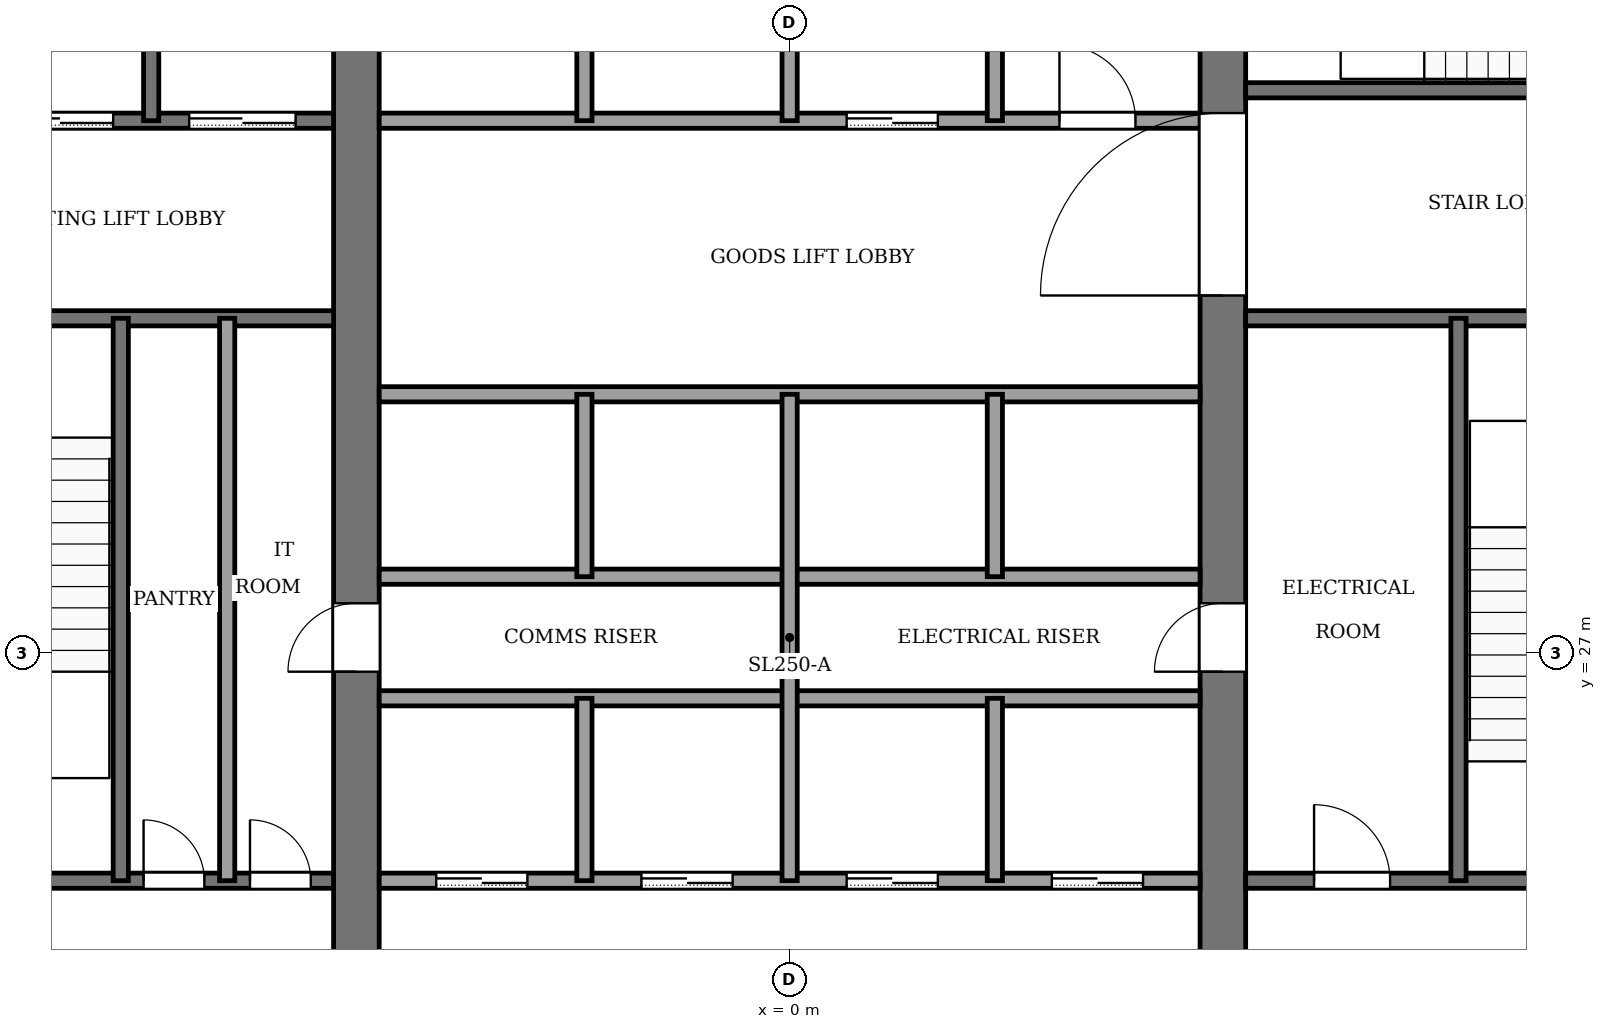
"""IFC4 building model, lengths in metres.
Left out: names, types, materials, properties, quantities, classifications, styles, units other than length and angle.
Written with IfcOpenShell. Run it as: python <this file> out.ifc"""

import sys

from ifc_helpers import new_model, si_unit, direction, frame, frame_2d, origin, place, context, subcontext, project, spatial, rectangle, extrude, element, fill, save


model = new_model("IFC4")
c1 = context("Model", 3, precision=1e-05, world=origin(), true_north=direction((0.0, 1.0)))
c2 = subcontext(c1, "Body", "Model", "MODEL_VIEW")
j1 = project(units=[si_unit("LENGTHUNIT", "METRE"), si_unit("PLANEANGLEUNIT", "RADIAN")], contexts=[c1])
p1 = place(None, origin())
s1 = spatial("IfcSite", under=j1, at=p1, CompositionType="ELEMENT")
p2 = place(p1, origin())
s2 = spatial("IfcBuilding", under=s1, at=p2, CompositionType="ELEMENT")
p3 = place(p2, frame((0.0, 0.0, 18.0)))
s3 = spatial("IfcBuildingStorey", under=s2, at=p3, CompositionType="ELEMENT", Elevation=18.0)
p4 = place(p3, frame((-5.7, 18.4, -0.13), z_axis=(0.0, 0.0, 1.0), x_axis=(0.0, 1.0, 0.0)))
e1 = element("IfcWall", 1, at=p4, inside=s3, PredefinedType="SHEAR", context=c2, shape_type="SweptSolid", body=[
    extrude(rectangle(XDim=19.2, YDim=0.6, at=frame_2d((9.6, 0.0))), origin(), (0.0, 0.0, 1.0), 4.0),
])
p5 = place(p4, frame((8.35, 0.0, 0.13)))
e2 = element("IfcOpeningElement", 2, at=p5, cuts=e1, PredefinedType="OPENING", context=c2, shape_type="SweptSolid", body=[
    extrude(rectangle(XDim=0.9, YDim=2.1, at=frame_2d((0.45, 1.05))), frame((0.0, 0.31, 0.0), z_axis=(0.0, -1.0, 0.0), x_axis=(1.0, 0.0, 0.0)), (0.0, 0.0, 1.0), 0.62),
])
p6 = place(p3, frame((5.7, 18.4, -0.13), z_axis=(0.0, 0.0, 1.0), x_axis=(0.0, 1.0, 0.0)))
e3 = element("IfcWall", 3, at=p6, inside=s3, PredefinedType="SHEAR", context=c2, shape_type="SweptSolid", body=[
    extrude(rectangle(XDim=19.2, YDim=0.6, at=frame_2d((9.6, 0.0))), origin(), (0.0, 0.0, 1.0), 4.0),
])
p7 = place(p6, frame((8.35, 0.0, 0.13)))
e4 = element("IfcOpeningElement", 4, at=p7, cuts=e3, PredefinedType="OPENING", context=c2, shape_type="SweptSolid", body=[
    extrude(rectangle(XDim=0.9, YDim=2.1, at=frame_2d((0.45, 1.05))), frame((0.0, 0.31, 0.0), z_axis=(0.0, -1.0, 0.0), x_axis=(1.0, 0.0, 0.0)), (0.0, 0.0, 1.0), 0.62),
])
p8 = place(p6, frame((13.3, 0.0, 0.13)))
e5 = element("IfcOpeningElement", 5, at=p8, cuts=e3, PredefinedType="OPENING", context=c2, shape_type="SweptSolid", body=[
    extrude(rectangle(XDim=2.4, YDim=2.4, at=frame_2d((1.2, 1.2))), frame((0.0, 0.31, 0.0), z_axis=(0.0, -1.0, 0.0), x_axis=(1.0, 0.0, 0.0)), (0.0, 0.0, 1.0), 0.62),
])
p9 = place(p3, frame((-12.6, 24.0, 0.0), z_axis=(0.0, 0.0, 1.0), x_axis=(1.0, 0.0, 0.0)))
e6 = element("IfcWall", 6, at=p9, inside=s3, PredefinedType="PARTITIONING", context=c2, shape_type="SweptSolid", body=[
    extrude(rectangle(XDim=6.6, YDim=0.2, at=frame_2d((3.3, 0.0))), origin(), (0.0, 0.0, 1.0), 3.87),
])
p10 = place(p9, frame((4.1, 0.0, 0.0)))
e7 = element("IfcOpeningElement", 7, at=p10, cuts=e6, PredefinedType="OPENING", context=c2, shape_type="SweptSolid", body=[
    extrude(rectangle(XDim=0.8, YDim=2.1, at=frame_2d((0.4, 1.05))), frame((0.0, 0.11, 0.0), z_axis=(0.0, -1.0, 0.0), x_axis=(1.0, 0.0, 0.0)), (0.0, 0.0, 1.0), 0.22),
])
p11 = place(p9, frame((5.5, 0.0, 0.0)))
e8 = element("IfcOpeningElement", 8, at=p11, cuts=e6, PredefinedType="OPENING", context=c2, shape_type="SweptSolid", body=[
    extrude(rectangle(XDim=0.8, YDim=2.1, at=frame_2d((0.4, 1.05))), frame((0.0, 0.11, 0.0), z_axis=(0.0, -1.0, 0.0), x_axis=(1.0, 0.0, 0.0)), (0.0, 0.0, 1.0), 0.22),
])
p12 = place(p3, frame((-5.4, 24.0, 0.0), z_axis=(0.0, 0.0, 1.0), x_axis=(1.0, 0.0, 0.0)))
e9 = element("IfcWall", 9, at=p12, inside=s3, PredefinedType="PARTITIONING", context=c2, shape_type="SweptSolid", body=[
    extrude(rectangle(XDim=10.8, YDim=0.2, at=frame_2d((5.4, 0.0))), origin(), (0.0, 0.0, 1.0), 3.87),
])
p13 = place(p12, frame((0.75, 0.0, 0.0)))
e10 = element("IfcOpeningElement", 10, at=p13, cuts=e9, PredefinedType="OPENING", context=c2, shape_type="SweptSolid", body=[
    extrude(rectangle(XDim=1.2, YDim=2.2, at=frame_2d((0.6, 1.1))), frame((0.0, 0.11, 0.0), z_axis=(0.0, -1.0, 0.0), x_axis=(1.0, 0.0, 0.0)), (0.0, 0.0, 1.0), 0.22),
])
p14 = place(p12, frame((3.45, 0.0, 0.0)))
e11 = element("IfcOpeningElement", 11, at=p14, cuts=e9, PredefinedType="OPENING", context=c2, shape_type="SweptSolid", body=[
    extrude(rectangle(XDim=1.2, YDim=2.2, at=frame_2d((0.6, 1.1))), frame((0.0, 0.11, 0.0), z_axis=(0.0, -1.0, 0.0), x_axis=(1.0, 0.0, 0.0)), (0.0, 0.0, 1.0), 0.22),
])
p15 = place(p12, frame((6.15, 0.0, 0.0)))
e12 = element("IfcOpeningElement", 12, at=p15, cuts=e9, PredefinedType="OPENING", context=c2, shape_type="SweptSolid", body=[
    extrude(rectangle(XDim=1.2, YDim=2.2, at=frame_2d((0.6, 1.1))), frame((0.0, 0.11, 0.0), z_axis=(0.0, -1.0, 0.0), x_axis=(1.0, 0.0, 0.0)), (0.0, 0.0, 1.0), 0.22),
])
p16 = place(p12, frame((8.85, 0.0, 0.0)))
e13 = element("IfcOpeningElement", 13, at=p16, cuts=e9, PredefinedType="OPENING", context=c2, shape_type="SweptSolid", body=[
    extrude(rectangle(XDim=1.2, YDim=2.2, at=frame_2d((0.6, 1.1))), frame((0.0, 0.11, 0.0), z_axis=(0.0, -1.0, 0.0), x_axis=(1.0, 0.0, 0.0)), (0.0, 0.0, 1.0), 0.22),
])
p17 = place(p3, frame((6.0, 24.0, 0.0), z_axis=(0.0, 0.0, 1.0), x_axis=(1.0, 0.0, 0.0)))
e14 = element("IfcWall", 14, at=p17, inside=s3, PredefinedType="PARTITIONING", context=c2, shape_type="SweptSolid", body=[
    extrude(rectangle(XDim=6.6, YDim=0.2, at=frame_2d((3.3, 0.0))), origin(), (0.0, 0.0, 1.0), 3.87),
])
p18 = place(p17, frame((0.9, 0.0, 0.0)))
e15 = element("IfcOpeningElement", 15, at=p18, cuts=e14, PredefinedType="OPENING", context=c2, shape_type="SweptSolid", body=[
    extrude(rectangle(XDim=1.0, YDim=2.1, at=frame_2d((0.5, 1.05))), frame((0.0, 0.11, 0.0), z_axis=(0.0, -1.0, 0.0), x_axis=(1.0, 0.0, 0.0)), (0.0, 0.0, 1.0), 0.22),
])
p19 = place(p17, frame((4.4, 0.0, 0.0)))
e16 = element("IfcOpeningElement", 16, at=p19, cuts=e14, PredefinedType="OPENING", context=c2, shape_type="SweptSolid", body=[
    extrude(rectangle(XDim=1.2, YDim=2.2, at=frame_2d((0.6, 1.1))), frame((0.0, 0.11, 0.0), z_axis=(0.0, -1.0, 0.0), x_axis=(1.0, 0.0, 0.0)), (0.0, 0.0, 1.0), 0.22),
])
for number, where, z_axis, x_axis in (
    (17, (-5.4, 26.4, 0.0), (0.0, 0.0, 1.0), (1.0, 0.0, 0.0)),
    (18, (-5.4, 28.0, 0.0), (0.0, 0.0, 1.0), (1.0, 0.0, 0.0)),
    (19, (-5.4, 30.4, 0.0), (0.0, 0.0, 1.0), (1.0, 0.0, 0.0)),
):
    element("IfcWall", number, at=place(p3, frame(where, z_axis=z_axis, x_axis=x_axis)), inside=s3, PredefinedType="PARTITIONING", context=c2, shape_type="SweptSolid", body=[
        extrude(rectangle(XDim=10.8, YDim=0.2, at=frame_2d((5.4, 0.0))), origin(), (0.0, 0.0, 1.0), 3.87),
    ])
p20 = place(p3, frame((-12.6, 31.4, 0.0), z_axis=(0.0, 0.0, 1.0), x_axis=(1.0, 0.0, 0.0)))
e20 = element("IfcWall", 20, at=p20, inside=s3, PredefinedType="PARTITIONING", context=c2, shape_type="SweptSolid", body=[
    extrude(rectangle(XDim=6.6, YDim=0.2, at=frame_2d((3.3, 0.0))), origin(), (0.0, 0.0, 1.0), 3.87),
])
p21 = place(p20, frame((1.0, 0.0, 0.0)))
e21 = element("IfcOpeningElement", 21, at=p21, cuts=e20, PredefinedType="OPENING", context=c2, shape_type="SweptSolid", body=[
    extrude(rectangle(XDim=1.2, YDim=2.2, at=frame_2d((0.6, 1.1))), frame((0.0, 0.11, 0.0), z_axis=(0.0, -1.0, 0.0), x_axis=(1.0, 0.0, 0.0)), (0.0, 0.0, 1.0), 0.22),
])
p22 = place(p3, frame((6.0, 31.4, 0.0), z_axis=(0.0, 0.0, 1.0), x_axis=(1.0, 0.0, 0.0)))
e22 = element("IfcWall", 22, at=p22, inside=s3, PredefinedType="PARTITIONING", context=c2, shape_type="SweptSolid", body=[
    extrude(rectangle(XDim=6.6, YDim=0.2, at=frame_2d((3.3, 0.0))), origin(), (0.0, 0.0, 1.0), 3.87),
])
p23 = place(p3, frame((-12.6, 34.0, 0.0), z_axis=(0.0, 0.0, 1.0), x_axis=(1.0, 0.0, 0.0)))
e23 = element("IfcWall", 23, at=p23, inside=s3, PredefinedType="PARTITIONING", context=c2, shape_type="SweptSolid", body=[
    extrude(rectangle(XDim=6.6, YDim=0.2, at=frame_2d((3.3, 0.0))), origin(), (0.0, 0.0, 1.0), 3.87),
])
p24 = place(p23, frame((4.7, 0.0, 0.0)))
e24 = element("IfcOpeningElement", 24, at=p24, cuts=e23, PredefinedType="OPENING", context=c2, shape_type="SweptSolid", body=[
    extrude(rectangle(XDim=1.4, YDim=2.2, at=frame_2d((0.7, 1.1))), frame((0.0, 0.11, 0.0), z_axis=(0.0, -1.0, 0.0), x_axis=(1.0, 0.0, 0.0)), (0.0, 0.0, 1.0), 0.22),
])
p25 = place(p23, frame((2.3, 0.0, 0.0)))
e25 = element("IfcOpeningElement", 25, at=p25, cuts=e23, PredefinedType="OPENING", context=c2, shape_type="SweptSolid", body=[
    extrude(rectangle(XDim=1.4, YDim=2.2, at=frame_2d((0.7, 1.1))), frame((0.0, 0.11, 0.0), z_axis=(0.0, -1.0, 0.0), x_axis=(1.0, 0.0, 0.0)), (0.0, 0.0, 1.0), 0.22),
])
p26 = place(p23, frame((0.45, 0.0, 0.0)))
e26 = element("IfcOpeningElement", 26, at=p26, cuts=e23, PredefinedType="OPENING", context=c2, shape_type="SweptSolid", body=[
    extrude(rectangle(XDim=0.9, YDim=2.1, at=frame_2d((0.45, 1.05))), frame((0.0, 0.11, 0.0), z_axis=(0.0, -1.0, 0.0), x_axis=(1.0, 0.0, 0.0)), (0.0, 0.0, 1.0), 0.22),
])
p27 = place(p3, frame((-5.4, 34.0, 0.0), z_axis=(0.0, 0.0, 1.0), x_axis=(1.0, 0.0, 0.0)))
e27 = element("IfcWall", 27, at=p27, inside=s3, PredefinedType="PARTITIONING", context=c2, shape_type="SweptSolid", body=[
    extrude(rectangle(XDim=10.8, YDim=0.2, at=frame_2d((5.4, 0.0))), origin(), (0.0, 0.0, 1.0), 3.87),
])
p28 = place(p27, frame((6.15, 0.0, 0.0)))
e28 = element("IfcOpeningElement", 28, at=p28, cuts=e27, PredefinedType="OPENING", context=c2, shape_type="SweptSolid", body=[
    extrude(rectangle(XDim=1.2, YDim=2.2, at=frame_2d((0.6, 1.1))), frame((0.0, 0.11, 0.0), z_axis=(0.0, -1.0, 0.0), x_axis=(1.0, 0.0, 0.0)), (0.0, 0.0, 1.0), 0.22),
])
p29 = place(p27, frame((8.95, 0.0, 0.0)))
e29 = element("IfcOpeningElement", 29, at=p29, cuts=e27, PredefinedType="OPENING", context=c2, shape_type="SweptSolid", body=[
    extrude(rectangle(XDim=1.0, YDim=2.1, at=frame_2d((0.5, 1.05))), frame((0.0, 0.11, 0.0), z_axis=(0.0, -1.0, 0.0), x_axis=(1.0, 0.0, 0.0)), (0.0, 0.0, 1.0), 0.22),
])
p30 = place(p3, frame((6.0, 34.4, 0.0), z_axis=(0.0, 0.0, 1.0), x_axis=(1.0, 0.0, 0.0)))
e30 = element("IfcWall", 30, at=p30, inside=s3, PredefinedType="PARTITIONING", context=c2, shape_type="SweptSolid", body=[
    extrude(rectangle(XDim=6.6, YDim=0.2, at=frame_2d((3.3, 0.0))), origin(), (0.0, 0.0, 1.0), 3.87),
])
p31 = place(p30, frame((4.8, 0.0, 0.0)))
e31 = element("IfcOpeningElement", 31, at=p31, cuts=e30, PredefinedType="OPENING", context=c2, shape_type="SweptSolid", body=[
    extrude(rectangle(XDim=1.2, YDim=2.2, at=frame_2d((0.6, 1.1))), frame((0.0, 0.11, 0.0), z_axis=(0.0, -1.0, 0.0), x_axis=(1.0, 0.0, 0.0)), (0.0, 0.0, 1.0), 0.22),
])
p32 = place(p3, frame((-8.8, 24.0, 0.0), z_axis=(0.0, 0.0, 1.0), x_axis=(0.0, 1.0, 0.0)))
e32 = element("IfcWall", 32, at=p32, inside=s3, PredefinedType="PARTITIONING", context=c2, shape_type="SweptSolid", body=[
    extrude(rectangle(XDim=7.4, YDim=0.2, at=frame_2d((3.7, 0.0))), origin(), (0.0, 0.0, 1.0), 3.87),
])
p33 = place(p3, frame((-8.4, 34.0, 0.0), z_axis=(0.0, 0.0, 1.0), x_axis=(0.0, 1.0, 0.0)))
e33 = element("IfcWall", 33, at=p33, inside=s3, PredefinedType="PARTITIONING", context=c2, shape_type="SweptSolid", body=[
    extrude(rectangle(XDim=3.6, YDim=0.2, at=frame_2d((1.8, 0.0))), origin(), (0.0, 0.0, 1.0), 3.87),
])
p34 = place(p3, frame((-7.4, 24.0, 0.0), z_axis=(0.0, 0.0, 1.0), x_axis=(0.0, 1.0, 0.0)))
e34 = element("IfcWall", 34, at=p34, inside=s3, PredefinedType="PARTITIONING", context=c2, shape_type="SweptSolid", body=[
    extrude(rectangle(XDim=7.4, YDim=0.2, at=frame_2d((3.7, 0.0))), origin(), (0.0, 0.0, 1.0), 3.87),
])
for number, where, z_axis, x_axis in (
    (35, (-2.7, 24.0, 0.0), (0.0, 0.0, 1.0), (0.0, 1.0, 0.0)),
    (36, (-2.7, 28.0, 0.0), (0.0, 0.0, 1.0), (0.0, 1.0, 0.0)),
):
    element("IfcWall", number, at=place(p3, frame(where, z_axis=z_axis, x_axis=x_axis)), inside=s3, PredefinedType="PARTITIONING", context=c2, shape_type="SweptSolid", body=[
        extrude(rectangle(XDim=2.4, YDim=0.2, at=frame_2d((1.2, 0.0))), origin(), (0.0, 0.0, 1.0), 3.87),
    ])
p35 = place(p3, frame((-2.7, 34.0, 0.0), z_axis=(0.0, 0.0, 1.0), x_axis=(0.0, 1.0, 0.0)))
e37 = element("IfcWall", 37, at=p35, inside=s3, PredefinedType="PARTITIONING", context=c2, shape_type="SweptSolid", body=[
    extrude(rectangle(XDim=3.6, YDim=0.2, at=frame_2d((1.8, 0.0))), origin(), (0.0, 0.0, 1.0), 3.87),
])
p36 = place(p3, frame((0.0, 24.0, 0.0), z_axis=(0.0, 0.0, 1.0), x_axis=(0.0, 1.0, 0.0)))
e38 = element("IfcWall", 38, at=p36, inside=s3, PredefinedType="PARTITIONING", context=c2, shape_type="SweptSolid", body=[
    extrude(rectangle(XDim=6.4, YDim=0.2, at=frame_2d((3.2, 0.0))), origin(), (0.0, 0.0, 1.0), 3.87),
])
p37 = place(p3, frame((0.0, 34.0, 0.0), z_axis=(0.0, 0.0, 1.0), x_axis=(0.0, 1.0, 0.0)))
e39 = element("IfcWall", 39, at=p37, inside=s3, PredefinedType="PARTITIONING", context=c2, shape_type="SweptSolid", body=[
    extrude(rectangle(XDim=3.6, YDim=0.2, at=frame_2d((1.8, 0.0))), origin(), (0.0, 0.0, 1.0), 3.87),
])
for number, where, z_axis, x_axis in (
    (40, (2.7, 24.0, 0.0), (0.0, 0.0, 1.0), (0.0, 1.0, 0.0)),
    (41, (2.7, 28.0, 0.0), (0.0, 0.0, 1.0), (0.0, 1.0, 0.0)),
):
    element("IfcWall", number, at=place(p3, frame(where, z_axis=z_axis, x_axis=x_axis)), inside=s3, PredefinedType="PARTITIONING", context=c2, shape_type="SweptSolid", body=[
        extrude(rectangle(XDim=2.4, YDim=0.2, at=frame_2d((1.2, 0.0))), origin(), (0.0, 0.0, 1.0), 3.87),
    ])
p38 = place(p3, frame((2.7, 34.0, 0.0), z_axis=(0.0, 0.0, 1.0), x_axis=(0.0, 1.0, 0.0)))
e42 = element("IfcWall", 42, at=p38, inside=s3, PredefinedType="PARTITIONING", context=c2, shape_type="SweptSolid", body=[
    extrude(rectangle(XDim=3.6, YDim=0.2, at=frame_2d((1.8, 0.0))), origin(), (0.0, 0.0, 1.0), 3.87),
])
p39 = place(p3, frame((8.8, 24.0, 0.0), z_axis=(0.0, 0.0, 1.0), x_axis=(0.0, 1.0, 0.0)))
e43 = element("IfcWall", 43, at=p39, inside=s3, PredefinedType="PARTITIONING", context=c2, shape_type="SweptSolid", body=[
    extrude(rectangle(XDim=7.4, YDim=0.2, at=frame_2d((3.7, 0.0))), origin(), (0.0, 0.0, 1.0), 3.87),
])
p40 = place(p13, origin())
e44 = element("IfcDoor", 44, at=p40, inside=s3, OperationType="SLIDING_TO_LEFT", PredefinedType="DOOR", context=c2, shape_type="SweptSolid", body=[
    extrude(rectangle(XDim=1.2, YDim=2.2, at=frame_2d((0.6, 1.1))), frame((0.0, 0.025, 0.0), z_axis=(0.0, -1.0, 0.0), x_axis=(1.0, 0.0, 0.0)), (0.0, 0.0, 1.0), 0.05),
])
fill(e10, e44)
p41 = place(p14, origin())
e45 = element("IfcDoor", 45, at=p41, inside=s3, OperationType="SLIDING_TO_LEFT", PredefinedType="DOOR", context=c2, shape_type="SweptSolid", body=[
    extrude(rectangle(XDim=1.2, YDim=2.2, at=frame_2d((0.6, 1.1))), frame((0.0, 0.025, 0.0), z_axis=(0.0, -1.0, 0.0), x_axis=(1.0, 0.0, 0.0)), (0.0, 0.0, 1.0), 0.05),
])
fill(e11, e45)
p42 = place(p15, origin())
e46 = element("IfcDoor", 46, at=p42, inside=s3, OperationType="SLIDING_TO_LEFT", PredefinedType="DOOR", context=c2, shape_type="SweptSolid", body=[
    extrude(rectangle(XDim=1.2, YDim=2.2, at=frame_2d((0.6, 1.1))), frame((0.0, 0.025, 0.0), z_axis=(0.0, -1.0, 0.0), x_axis=(1.0, 0.0, 0.0)), (0.0, 0.0, 1.0), 0.05),
])
fill(e12, e46)
p43 = place(p16, origin())
e47 = element("IfcDoor", 47, at=p43, inside=s3, OperationType="SLIDING_TO_LEFT", PredefinedType="DOOR", context=c2, shape_type="SweptSolid", body=[
    extrude(rectangle(XDim=1.2, YDim=2.2, at=frame_2d((0.6, 1.1))), frame((0.0, 0.025, 0.0), z_axis=(0.0, -1.0, 0.0), x_axis=(1.0, 0.0, 0.0)), (0.0, 0.0, 1.0), 0.05),
])
fill(e13, e47)
p44 = place(p28, origin())
e48 = element("IfcDoor", 48, at=p44, inside=s3, OperationType="SLIDING_TO_LEFT", PredefinedType="DOOR", context=c2, shape_type="SweptSolid", body=[
    extrude(rectangle(XDim=1.2, YDim=2.2, at=frame_2d((0.6, 1.1))), frame((0.0, 0.025, 0.0), z_axis=(0.0, -1.0, 0.0), x_axis=(1.0, 0.0, 0.0)), (0.0, 0.0, 1.0), 0.05),
])
fill(e28, e48)
p45 = place(p24, origin())
e49 = element("IfcDoor", 49, at=p45, inside=s3, OperationType="SLIDING_TO_LEFT", PredefinedType="DOOR", context=c2, shape_type="SweptSolid", body=[
    extrude(rectangle(XDim=1.4, YDim=2.2, at=frame_2d((0.7, 1.1))), frame((0.0, 0.025, 0.0), z_axis=(0.0, -1.0, 0.0), x_axis=(1.0, 0.0, 0.0)), (0.0, 0.0, 1.0), 0.05),
])
fill(e24, e49)
p46 = place(p25, origin())
e50 = element("IfcDoor", 50, at=p46, inside=s3, OperationType="SLIDING_TO_LEFT", PredefinedType="DOOR", context=c2, shape_type="SweptSolid", body=[
    extrude(rectangle(XDim=1.4, YDim=2.2, at=frame_2d((0.7, 1.1))), frame((0.0, 0.025, 0.0), z_axis=(0.0, -1.0, 0.0), x_axis=(1.0, 0.0, 0.0)), (0.0, 0.0, 1.0), 0.05),
])
fill(e25, e50)
p47 = place(p10, origin())
e51 = element("IfcDoor", 51, at=p47, inside=s3, OperationType="SINGLE_SWING_LEFT", PredefinedType="DOOR", context=c2, shape_type="SweptSolid", body=[
    extrude(rectangle(XDim=0.8, YDim=2.1, at=frame_2d((0.4, 1.05))), frame((0.0, 0.025, 0.0), z_axis=(0.0, -1.0, 0.0), x_axis=(1.0, 0.0, 0.0)), (0.0, 0.0, 1.0), 0.05),
])
fill(e7, e51)
p48 = place(p11, origin())
e52 = element("IfcDoor", 52, at=p48, inside=s3, OperationType="SINGLE_SWING_RIGHT", PredefinedType="DOOR", context=c2, shape_type="SweptSolid", body=[
    extrude(rectangle(XDim=0.8, YDim=2.1, at=frame_2d((0.4, 1.05))), frame((0.0, 0.025, 0.0), z_axis=(0.0, -1.0, 0.0), x_axis=(1.0, 0.0, 0.0)), (0.0, 0.0, 1.0), 0.05),
])
fill(e8, e52)
p49 = place(p18, origin())
e53 = element("IfcDoor", 53, at=p49, inside=s3, OperationType="SINGLE_SWING_RIGHT", PredefinedType="DOOR", context=c2, shape_type="SweptSolid", body=[
    extrude(rectangle(XDim=1.0, YDim=2.1, at=frame_2d((0.5, 1.05))), frame((0.0, 0.025, 0.0), z_axis=(0.0, -1.0, 0.0), x_axis=(1.0, 0.0, 0.0)), (0.0, 0.0, 1.0), 0.05),
])
fill(e15, e53)
p50 = place(p29, origin())
e54 = element("IfcDoor", 54, at=p50, inside=s3, OperationType="SINGLE_SWING_LEFT", PredefinedType="DOOR", context=c2, shape_type="SweptSolid", body=[
    extrude(rectangle(XDim=1.0, YDim=2.1, at=frame_2d((0.5, 1.05))), frame((0.0, 0.025, 0.0), z_axis=(0.0, -1.0, 0.0), x_axis=(1.0, 0.0, 0.0)), (0.0, 0.0, 1.0), 0.05),
])
fill(e29, e54)
p51 = place(p5, origin())
e55 = element("IfcDoor", 55, at=p51, inside=s3, OperationType="SINGLE_SWING_LEFT", PredefinedType="DOOR", context=c2, shape_type="SweptSolid", body=[
    extrude(rectangle(XDim=0.9, YDim=2.1, at=frame_2d((0.45, 1.05))), frame((0.0, 0.025, 0.0), z_axis=(0.0, -1.0, 0.0), x_axis=(1.0, 0.0, 0.0)), (0.0, 0.0, 1.0), 0.05),
])
fill(e2, e55)
p52 = place(p7, origin())
e56 = element("IfcDoor", 56, at=p52, inside=s3, OperationType="SINGLE_SWING_RIGHT", PredefinedType="DOOR", context=c2, shape_type="SweptSolid", body=[
    extrude(rectangle(XDim=0.9, YDim=2.1, at=frame_2d((0.45, 1.05))), frame((0.0, 0.025, 0.0), z_axis=(0.0, -1.0, 0.0), x_axis=(1.0, 0.0, 0.0)), (0.0, 0.0, 1.0), 0.05),
])
fill(e4, e56)
p53 = place(p8, origin())
e57 = element("IfcDoor", 57, at=p53, inside=s3, OperationType="DOUBLE_DOOR_SINGLE_SWING", PredefinedType="DOOR", context=c2, shape_type="SweptSolid", body=[
    extrude(rectangle(XDim=2.4, YDim=2.4, at=frame_2d((1.2, 1.2))), frame((0.0, 0.025, 0.0), z_axis=(0.0, -1.0, 0.0), x_axis=(1.0, 0.0, 0.0)), (0.0, 0.0, 1.0), 0.05),
])
fill(e5, e57)
save(model, sys.argv[1])
